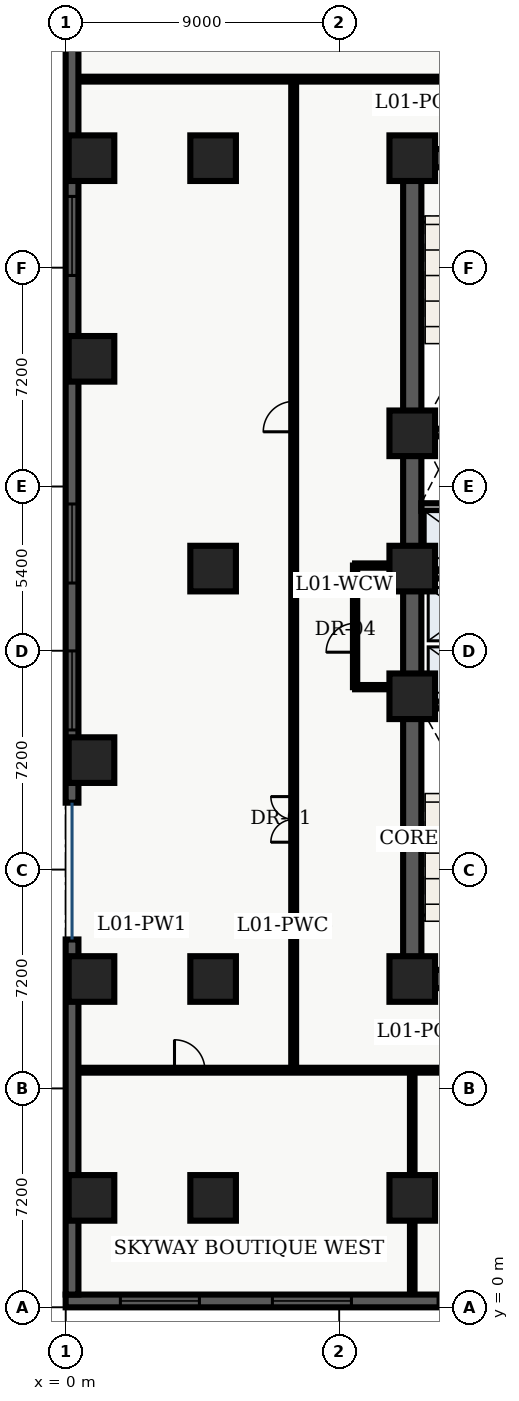
"""IFC4 building model, lengths in metres.
Left out: names, types, materials, properties, quantities, classifications, styles, units other than length and angle.
Written with IfcOpenShell. Run it as: python <this file> out.ifc"""

import sys

from ifc_helpers import new_model, entity, si_unit, converted_unit, direction, frame, origin_with_axes, origin_2d_with_axis, place, context, subcontext, project, spatial, polyline, rectangle, outline, extrude, element, fill, save


model = new_model("IFC4")
c1 = context("Model", 3, precision=1e-05, world=origin_with_axes(), true_north=direction((0.0, 1.0)))
c2 = subcontext(c1, "Body", "Model", "MODEL_VIEW")
j1 = project(units=[si_unit("LENGTHUNIT", "METRE"), converted_unit("PLANEANGLEUNIT", "DEGREE", entity("IfcPlaneAngleMeasure", 0.017), si_unit("PLANEANGLEUNIT", "RADIAN"), dimensions=[0, 0, 0, 0, 0, 0, 0])], contexts=[c1])
p1 = place(None, origin_with_axes())
s1 = spatial("IfcSite", under=j1, at=p1, CompositionType="ELEMENT")
p2 = place(p1, origin_with_axes())
s2 = spatial("IfcBuilding", under=s1, at=p2, CompositionType="ELEMENT")
p3 = place(p2, frame((0.0, 0.0, 5.7), z_axis=(0.0, 0.0, 1.0), x_axis=(1.0, 0.0, 0.0)))
s3 = spatial("IfcBuildingStorey", under=s2, at=p3, CompositionType="ELEMENT", Elevation=5.7)
p4 = place(p3, frame((11.4, 10.8, 0.0), z_axis=(0.0, 0.0, 1.0), x_axis=(0.0, 1.0, 0.0)))
e1 = element("IfcWall", 1, at=p4, inside=s3, PredefinedType="SHEAR", context=c2, shape_type="SweptSolid", body=[
    extrude(outline(polyline([(0.0, -0.3), (27.0, -0.3), (27.0, 0.3), (0.0, 0.3), (0.0, -0.3)])), origin_with_axes(), (0.0, 0.0, 1.0), 4.86),
])
p5 = place(p3, frame((11.4, 10.8, 0.0), z_axis=(0.0, 0.0, 1.0), x_axis=(1.0, 0.0, 0.0)))
e2 = element("IfcWall", 2, at=p5, inside=s3, PredefinedType="SHEAR", context=c2, shape_type="SweptSolid", body=[
    extrude(outline(polyline([(0.0, -0.3), (7.2, -0.3), (7.2, 0.3), (0.0, 0.3), (0.0, -0.3)])), origin_with_axes(), (0.0, 0.0, 1.0), 4.86),
])
p6 = place(p5, frame((2.625, 0.0, 0.0), z_axis=(0.0, 0.0, 1.0), x_axis=(1.0, 0.0, 0.0)))
e3 = element("IfcOpeningElement", 3, at=p6, cuts=e2, PredefinedType="OPENING", context=c2, shape_type="SweptSolid", body=[
    extrude(rectangle(XDim=1.05, YDim=0.62, at=origin_2d_with_axis()), origin_with_axes(), (0.0, 0.0, 1.0), 2.15),
])
p7 = place(p3, frame((11.4, 37.8, 0.0), z_axis=(0.0, 0.0, 1.0), x_axis=(1.0, 0.0, 0.0)))
e4 = element("IfcWall", 4, at=p7, inside=s3, PredefinedType="SHEAR", context=c2, shape_type="SweptSolid", body=[
    extrude(outline(polyline([(0.0, -0.3), (7.2, -0.3), (7.2, 0.3), (0.0, 0.3), (0.0, -0.3)])), origin_with_axes(), (0.0, 0.0, 1.0), 4.86),
])
p8 = place(p7, frame((2.625, 0.0, 0.0), z_axis=(0.0, 0.0, 1.0), x_axis=(1.0, 0.0, 0.0)))
e5 = element("IfcOpeningElement", 5, at=p8, cuts=e4, PredefinedType="OPENING", context=c2, shape_type="SweptSolid", body=[
    extrude(rectangle(XDim=1.05, YDim=0.62, at=origin_2d_with_axis()), origin_with_axes(), (0.0, 0.0, 1.0), 2.15),
])
for number, where, z_axis, x_axis in (
    (6, (11.7, 19.825, 0.0), (0.0, 0.0, 1.0), (1.0, 0.0, 0.0)),
    (7, (11.7, 28.775, 0.0), (0.0, 0.0, 1.0), (1.0, 0.0, 0.0)),
):
    element("IfcWall", number, at=place(p3, frame(where, z_axis=z_axis, x_axis=x_axis)), inside=s3, PredefinedType="SHEAR", context=c2, shape_type="SweptSolid", body=[
        extrude(outline(polyline([(0.0, -0.125), (6.6, -0.125), (6.6, 0.125), (0.0, 0.125), (0.0, -0.125)])), origin_with_axes(), (0.0, 0.0, 1.0), 4.86),
    ])
p9 = place(p3, frame((11.7, 24.1, 0.0), z_axis=(0.0, 0.0, 1.0), x_axis=(1.0, 0.0, 0.0)))
e8 = element("IfcWall", 8, at=p9, inside=s3, PredefinedType="SOLIDWALL", context=c2, shape_type="SweptSolid", body=[
    extrude(outline(polyline([(0.0, -0.125), (6.6, -0.125), (6.6, 0.125), (0.0, 0.125), (0.0, -0.125)])), origin_with_axes(), (0.0, 0.0, 1.0), 3.6),
])
p10 = place(p9, frame((3.75, 0.0, 0.0), z_axis=(0.0, 0.0, 1.0), x_axis=(1.0, 0.0, 0.0)))
e9 = element("IfcOpeningElement", 9, at=p10, cuts=e8, PredefinedType="OPENING", context=c2, shape_type="SweptSolid", body=[
    extrude(rectangle(XDim=0.9, YDim=0.27, at=origin_2d_with_axis()), origin_with_axes(), (0.0, 0.0, 1.0), 2.15),
])
p11 = place(p3, frame((11.7, 26.325, 0.0), z_axis=(0.0, 0.0, 1.0), x_axis=(1.0, 0.0, 0.0)))
e10 = element("IfcWall", 10, at=p11, inside=s3, PredefinedType="SOLIDWALL", context=c2, shape_type="SweptSolid", body=[
    extrude(outline(polyline([(0.0, -0.125), (6.6, -0.125), (6.6, 0.125), (0.0, 0.125), (0.0, -0.125)])), origin_with_axes(), (0.0, 0.0, 1.0), 3.6),
])
p12 = place(p11, frame((3.5, 0.0, 0.0), z_axis=(0.0, 0.0, 1.0), x_axis=(1.0, 0.0, 0.0)))
e11 = element("IfcOpeningElement", 11, at=p12, cuts=e10, PredefinedType="OPENING", context=c2, shape_type="SweptSolid", body=[
    extrude(rectangle(XDim=0.9, YDim=0.27, at=origin_2d_with_axis()), origin_with_axes(), (0.0, 0.0, 1.0), 2.15),
])
for number, where, z_axis, x_axis in (
    (12, (11.4, 3.6, 0.0), (0.0, 0.0, 1.0), (1.0, 0.0, 0.0)),
    (13, (11.4, 10.8, 0.0), (0.0, 0.0, 1.0), (1.0, 0.0, 0.0)),
    (14, (11.4, 20.1, 0.0), (0.0, 0.0, 1.0), (1.0, 0.0, 0.0)),
    (15, (11.4, 24.3, 0.0), (0.0, 0.0, 1.0), (1.0, 0.0, 0.0)),
    (16, (11.4, 28.75, 0.0), (0.0, 0.0, 1.0), (1.0, 0.0, 0.0)),
    (17, (11.4, 37.8, 0.0), (0.0, 0.0, 1.0), (1.0, 0.0, 0.0)),
    (18, (4.85, 3.6, 0.0), (0.0, 0.0, 1.0), (1.0, 0.0, 0.0)),
    (19, (4.85, 10.8, 0.0), (0.0, 0.0, 1.0), (1.0, 0.0, 0.0)),
    (20, (4.85, 24.3, 0.0), (0.0, 0.0, 1.0), (1.0, 0.0, 0.0)),
    (21, (4.85, 37.8, 0.0), (0.0, 0.0, 1.0), (1.0, 0.0, 0.0)),
    (22, (0.85, 3.6, 0.0), (0.0, 0.0, 1.0), (1.0, 0.0, 0.0)),
    (23, (0.85, 10.8, 0.0), (0.0, 0.0, 1.0), (1.0, 0.0, 0.0)),
    (24, (0.85, 18.0, 0.0), (0.0, 0.0, 1.0), (1.0, 0.0, 0.0)),
    (25, (0.85, 31.2, 0.0), (0.0, 0.0, 1.0), (1.0, 0.0, 0.0)),
    (26, (0.85, 37.8, 0.0), (0.0, 0.0, 1.0), (1.0, 0.0, 0.0)),
):
    element("IfcColumn", number, at=place(p3, frame(where, z_axis=z_axis, x_axis=x_axis)), inside=s3, PredefinedType="COLUMN", context=c2, shape_type="SweptSolid", body=[
        extrude(rectangle(XDim=1.5, YDim=1.5, at=origin_2d_with_axis()), origin_with_axes(), (0.0, 0.0, 1.0), 5.1),
    ])
p13 = place(p3, frame((9.52, 20.4, 0.0), z_axis=(0.0, 0.0, 1.0), x_axis=(0.0, 1.0, 0.0)))
e27 = element("IfcWall", 27, at=p13, inside=s3, PredefinedType="PARTITIONING", context=c2, shape_type="SweptSolid", body=[
    extrude(outline(polyline([(0.0, -0.07), (4.0, -0.07), (4.0, 0.07), (0.0, 0.07), (0.0, -0.07)])), origin_with_axes(), (0.0, 0.0, 1.0), 3.2),
])
p14 = place(p13, frame((1.625, 0.0, 0.0), z_axis=(0.0, 0.0, 1.0), x_axis=(1.0, 0.0, 0.0)))
e28 = element("IfcOpeningElement", 28, at=p14, cuts=e27, PredefinedType="OPENING", context=c2, shape_type="SweptSolid", body=[
    extrude(rectangle(XDim=0.95, YDim=0.16, at=origin_2d_with_axis()), origin_with_axes(), (0.0, 0.0, 1.0), 2.15),
])
for number, where, z_axis, x_axis in (
    (29, (9.52, 20.4, 0.0), (0.0, 0.0, 1.0), (1.0, 0.0, 0.0)),
    (30, (9.52, 24.4, 0.0), (0.0, 0.0, 1.0), (1.0, 0.0, 0.0)),
):
    element("IfcWall", number, at=place(p3, frame(where, z_axis=z_axis, x_axis=x_axis)), inside=s3, PredefinedType="PARTITIONING", context=c2, shape_type="SweptSolid", body=[
        extrude(outline(polyline([(0.0, -0.07), (1.58, -0.07), (1.58, 0.07), (0.0, 0.07), (0.0, -0.07)])), origin_with_axes(), (0.0, 0.0, 1.0), 3.2),
    ])
p15 = place(p3, frame((0.38, 7.8, 0.0), z_axis=(0.0, 0.0, 1.0), x_axis=(1.0, 0.0, 0.0)))
e31 = element("IfcWall", 31, at=p15, inside=s3, PredefinedType="PARTITIONING", context=c2, shape_type="SweptSolid", body=[
    extrude(outline(polyline([(0.0, -0.08), (20.92, -0.08), (20.92, 0.08), (0.0, 0.08), (0.0, -0.08)])), origin_with_axes(), (0.0, 0.0, 1.0), 3.2),
])
p16 = place(p15, frame((3.7, 0.0, 0.0), z_axis=(0.0, 0.0, 1.0), x_axis=(1.0, 0.0, 0.0)))
e32 = element("IfcOpeningElement", 32, at=p16, cuts=e31, PredefinedType="OPENING", context=c2, shape_type="SweptSolid", body=[
    extrude(rectangle(XDim=1.0, YDim=0.18, at=origin_2d_with_axis()), origin_with_axes(), (0.0, 0.0, 1.0), 2.15),
])
p17 = place(p15, frame((15.3, 0.0, 0.0), z_axis=(0.0, 0.0, 1.0), x_axis=(1.0, 0.0, 0.0)))
e33 = element("IfcOpeningElement", 33, at=p17, cuts=e31, PredefinedType="OPENING", context=c2, shape_type="SweptSolid", body=[
    extrude(rectangle(XDim=1.0, YDim=0.18, at=origin_2d_with_axis()), origin_with_axes(), (0.0, 0.0, 1.0), 2.15),
])
p18 = place(p3, frame((11.4, 0.38, 0.0), z_axis=(0.0, 0.0, 1.0), x_axis=(0.0, 1.0, 0.0)))
e34 = element("IfcWall", 34, at=p18, inside=s3, PredefinedType="PARTITIONING", context=c2, shape_type="SweptSolid", body=[
    extrude(outline(polyline([(0.0, -0.075), (7.42, -0.075), (7.42, 0.075), (0.0, 0.075), (0.0, -0.075)])), origin_with_axes(), (0.0, 0.0, 1.0), 3.2),
])
p19 = place(p3, frame((0.38, 40.4, 0.0), z_axis=(0.0, 0.0, 1.0), x_axis=(1.0, 0.0, 0.0)))
e35 = element("IfcWall", 35, at=p19, inside=s3, PredefinedType="PARTITIONING", context=c2, shape_type="SweptSolid", body=[
    extrude(outline(polyline([(0.0, -0.08), (20.92, -0.08), (20.92, 0.08), (0.0, 0.08), (0.0, -0.08)])), origin_with_axes(), (0.0, 0.0, 1.0), 3.2),
])
p20 = place(p19, frame((15.25, 0.0, 0.0), z_axis=(0.0, 0.0, 1.0), x_axis=(1.0, 0.0, 0.0)))
e36 = element("IfcOpeningElement", 36, at=p20, cuts=e35, PredefinedType="OPENING", context=c2, shape_type="SweptSolid", body=[
    extrude(rectangle(XDim=1.5, YDim=0.18, at=origin_2d_with_axis()), origin_with_axes(), (0.0, 0.0, 1.0), 2.2),
])
p21 = place(p3, frame((7.5, 7.8, 0.0), z_axis=(0.0, 0.0, 1.0), x_axis=(0.0, 1.0, 0.0)))
e37 = element("IfcWall", 37, at=p21, inside=s3, PredefinedType="PARTITIONING", context=c2, shape_type="SweptSolid", body=[
    extrude(outline(polyline([(0.0, -0.08), (32.6, -0.08), (32.6, 0.08), (0.0, 0.08), (0.0, -0.08)])), origin_with_axes(), (0.0, 0.0, 1.0), 3.2),
])
p22 = place(p21, frame((8.25, 0.0, 0.0), z_axis=(0.0, 0.0, 1.0), x_axis=(1.0, 0.0, 0.0)))
e38 = element("IfcOpeningElement", 38, at=p22, cuts=e37, PredefinedType="OPENING", context=c2, shape_type="SweptSolid", body=[
    extrude(rectangle(XDim=1.5, YDim=0.18, at=origin_2d_with_axis()), origin_with_axes(), (0.0, 0.0, 1.0), 2.2),
])
p23 = place(p21, frame((21.5, 0.0, 0.0), z_axis=(0.0, 0.0, 1.0), x_axis=(1.0, 0.0, 0.0)))
e39 = element("IfcOpeningElement", 39, at=p23, cuts=e37, PredefinedType="OPENING", context=c2, shape_type="SweptSolid", body=[
    extrude(rectangle(XDim=1.0, YDim=0.18, at=origin_2d_with_axis()), origin_with_axes(), (0.0, 0.0, 1.0), 2.15),
])
p24 = place(p3, frame((31.2, 0.21, 0.0), z_axis=(0.0, 0.0, 1.0), x_axis=(-1.0, 0.0, 0.0)))
e40 = element("IfcWall", 40, at=p24, inside=s3, PredefinedType="SOLIDWALL", context=c2, shape_type="SweptSolid", body=[
    extrude(outline(polyline([(0.0, -0.21), (31.2, -0.21), (31.2, 0.21), (0.0, 0.21), (0.0, -0.21)])), origin_with_axes(), (0.0, 0.0, 1.0), 4.86),
])
p25 = place(p24, frame((3.1, 0.0, 0.45), z_axis=(0.0, 0.0, 1.0), x_axis=(1.0, 0.0, 0.0)))
e41 = element("IfcOpeningElement", 41, at=p25, cuts=e40, PredefinedType="OPENING", context=c2, shape_type="SweptSolid", body=[
    extrude(rectangle(XDim=2.6, YDim=0.44, at=origin_2d_with_axis()), origin_with_axes(), (0.0, 0.0, 1.0), 2.8),
])
p26 = place(p24, frame((7.65, 0.0, 0.45), z_axis=(0.0, 0.0, 1.0), x_axis=(1.0, 0.0, 0.0)))
e42 = element("IfcOpeningElement", 42, at=p26, cuts=e40, PredefinedType="OPENING", context=c2, shape_type="SweptSolid", body=[
    extrude(rectangle(XDim=2.6, YDim=0.44, at=origin_2d_with_axis()), origin_with_axes(), (0.0, 0.0, 1.0), 2.8),
])
p27 = place(p24, frame((13.1, 0.0, 0.45), z_axis=(0.0, 0.0, 1.0), x_axis=(1.0, 0.0, 0.0)))
e43 = element("IfcOpeningElement", 43, at=p27, cuts=e40, PredefinedType="OPENING", context=c2, shape_type="SweptSolid", body=[
    extrude(rectangle(XDim=2.6, YDim=0.44, at=origin_2d_with_axis()), origin_with_axes(), (0.0, 0.0, 1.0), 2.8),
])
p28 = place(p24, frame((17.65, 0.0, 0.45), z_axis=(0.0, 0.0, 1.0), x_axis=(1.0, 0.0, 0.0)))
e44 = element("IfcOpeningElement", 44, at=p28, cuts=e40, PredefinedType="OPENING", context=c2, shape_type="SweptSolid", body=[
    extrude(rectangle(XDim=2.6, YDim=0.44, at=origin_2d_with_axis()), origin_with_axes(), (0.0, 0.0, 1.0), 2.8),
])
p29 = place(p24, frame((23.1, 0.0, 0.45), z_axis=(0.0, 0.0, 1.0), x_axis=(1.0, 0.0, 0.0)))
e45 = element("IfcOpeningElement", 45, at=p29, cuts=e40, PredefinedType="OPENING", context=c2, shape_type="SweptSolid", body=[
    extrude(rectangle(XDim=2.6, YDim=0.44, at=origin_2d_with_axis()), origin_with_axes(), (0.0, 0.0, 1.0), 2.8),
])
p30 = place(p24, frame((28.1, 0.0, 0.45), z_axis=(0.0, 0.0, 1.0), x_axis=(1.0, 0.0, 0.0)))
e46 = element("IfcOpeningElement", 46, at=p30, cuts=e40, PredefinedType="OPENING", context=c2, shape_type="SweptSolid", body=[
    extrude(rectangle(XDim=2.6, YDim=0.44, at=origin_2d_with_axis()), origin_with_axes(), (0.0, 0.0, 1.0), 2.8),
])
p31 = place(p3, frame((0.21, 0.42, 0.0), z_axis=(0.0, 0.0, 1.0), x_axis=(0.0, 1.0, 0.0)))
e47 = element("IfcWall", 47, at=p31, inside=s3, PredefinedType="SOLIDWALL", context=c2, shape_type="SweptSolid", body=[
    extrude(outline(polyline([(0.0, -0.21), (11.68, -0.21), (11.68, 0.21), (0.0, 0.21), (0.0, -0.21)])), origin_with_axes(), (0.0, 0.0, 1.0), 4.86),
])
p32 = place(p3, frame((0.21, 16.6, 0.0), z_axis=(0.0, 0.0, 1.0), x_axis=(0.0, 1.0, 0.0)))
e48 = element("IfcWall", 48, at=p32, inside=s3, PredefinedType="SOLIDWALL", context=c2, shape_type="SweptSolid", body=[
    extrude(outline(polyline([(0.0, -0.21), (32.9, -0.21), (32.9, 0.21), (0.0, 0.21), (0.0, -0.21)])), origin_with_axes(), (0.0, 0.0, 1.0), 4.86),
])
p33 = place(p32, frame((3.692, 0.0, 0.45), z_axis=(0.0, 0.0, 1.0), x_axis=(1.0, 0.0, 0.0)))
e49 = element("IfcOpeningElement", 49, at=p33, cuts=e48, PredefinedType="OPENING", context=c2, shape_type="SweptSolid", body=[
    extrude(rectangle(XDim=2.6, YDim=0.44, at=origin_2d_with_axis()), origin_with_axes(), (0.0, 0.0, 1.0), 2.8),
])
p34 = place(p32, frame((8.525, 0.0, 0.45), z_axis=(0.0, 0.0, 1.0), x_axis=(1.0, 0.0, 0.0)))
e50 = element("IfcOpeningElement", 50, at=p34, cuts=e48, PredefinedType="OPENING", context=c2, shape_type="SweptSolid", body=[
    extrude(rectangle(XDim=2.6, YDim=0.44, at=origin_2d_with_axis()), origin_with_axes(), (0.0, 0.0, 1.0), 2.8),
])
p35 = place(p32, frame((18.642, 0.0, 0.45), z_axis=(0.0, 0.0, 1.0), x_axis=(1.0, 0.0, 0.0)))
e51 = element("IfcOpeningElement", 51, at=p35, cuts=e48, PredefinedType="OPENING", context=c2, shape_type="SweptSolid", body=[
    extrude(rectangle(XDim=2.6, YDim=0.44, at=origin_2d_with_axis()), origin_with_axes(), (0.0, 0.0, 1.0), 2.8),
])
p36 = place(p13, frame((1.625, 0.0, 0.0), z_axis=(0.0, 0.0, 1.0), x_axis=(1.0, 0.0, 0.0)))
e52 = element("IfcDoor", 52, at=p36, inside=s3, OperationType="SINGLE_SWING_LEFT", PredefinedType="DOOR", context=c2, shape_type="SweptSolid", body=[
    extrude(rectangle(XDim=0.95, YDim=0.084, at=origin_2d_with_axis()), origin_with_axes(), (0.0, 0.0, 1.0), 2.15),
])
fill(e28, e52)
p37 = place(p15, frame((3.7, 0.0, 0.0), z_axis=(0.0, 0.0, 1.0), x_axis=(1.0, 0.0, 0.0)))
e53 = element("IfcDoor", 53, at=p37, inside=s3, OperationType="SINGLE_SWING_LEFT", PredefinedType="DOOR", context=c2, shape_type="SweptSolid", body=[
    extrude(rectangle(XDim=1.0, YDim=0.09, at=origin_2d_with_axis()), origin_with_axes(), (0.0, 0.0, 1.0), 2.15),
])
fill(e32, e53)
p38 = place(p21, frame((8.25, 0.0, 0.0), z_axis=(0.0, 0.0, 1.0), x_axis=(1.0, 0.0, 0.0)))
e54 = element("IfcDoor", 54, at=p38, inside=s3, OperationType="DOUBLE_DOOR_SINGLE_SWING", PredefinedType="DOOR", context=c2, shape_type="SweptSolid", body=[
    extrude(rectangle(XDim=1.5, YDim=0.09, at=origin_2d_with_axis()), origin_with_axes(), (0.0, 0.0, 1.0), 2.2),
])
fill(e38, e54)
p39 = place(p21, frame((21.5, 0.0, 0.0), z_axis=(0.0, 0.0, 1.0), x_axis=(1.0, 0.0, 0.0)))
e55 = element("IfcDoor", 55, at=p39, inside=s3, OperationType="SINGLE_SWING_LEFT", PredefinedType="DOOR", context=c2, shape_type="SweptSolid", body=[
    extrude(rectangle(XDim=1.0, YDim=0.09, at=origin_2d_with_axis()), origin_with_axes(), (0.0, 0.0, 1.0), 2.15),
])
fill(e39, e55)
p40 = place(p24, frame((17.65, 0.0, 0.45), z_axis=(0.0, 0.0, 1.0), x_axis=(1.0, 0.0, 0.0)))
e56 = element("IfcWindow", 56, at=p40, inside=s3, PredefinedType="WINDOW", context=c2, shape_type="SweptSolid", body=[
    extrude(rectangle(XDim=2.6, YDim=0.09, at=origin_2d_with_axis()), origin_with_axes(), (0.0, 0.0, 1.0), 2.8),
])
fill(e44, e56)
p41 = place(p24, frame((23.1, 0.0, 0.45), z_axis=(0.0, 0.0, 1.0), x_axis=(1.0, 0.0, 0.0)))
e57 = element("IfcWindow", 57, at=p41, inside=s3, PredefinedType="WINDOW", context=c2, shape_type="SweptSolid", body=[
    extrude(rectangle(XDim=2.6, YDim=0.09, at=origin_2d_with_axis()), origin_with_axes(), (0.0, 0.0, 1.0), 2.8),
])
fill(e45, e57)
p42 = place(p24, frame((28.1, 0.0, 0.45), z_axis=(0.0, 0.0, 1.0), x_axis=(1.0, 0.0, 0.0)))
e58 = element("IfcWindow", 58, at=p42, inside=s3, PredefinedType="WINDOW", context=c2, shape_type="SweptSolid", body=[
    extrude(rectangle(XDim=2.6, YDim=0.09, at=origin_2d_with_axis()), origin_with_axes(), (0.0, 0.0, 1.0), 2.8),
])
fill(e46, e58)
p43 = place(p32, frame((3.692, 0.0, 0.45), z_axis=(0.0, 0.0, 1.0), x_axis=(1.0, 0.0, 0.0)))
e59 = element("IfcWindow", 59, at=p43, inside=s3, PredefinedType="WINDOW", context=c2, shape_type="SweptSolid", body=[
    extrude(rectangle(XDim=2.6, YDim=0.09, at=origin_2d_with_axis()), origin_with_axes(), (0.0, 0.0, 1.0), 2.8),
])
fill(e49, e59)
p44 = place(p32, frame((8.525, 0.0, 0.45), z_axis=(0.0, 0.0, 1.0), x_axis=(1.0, 0.0, 0.0)))
e60 = element("IfcWindow", 60, at=p44, inside=s3, PredefinedType="WINDOW", context=c2, shape_type="SweptSolid", body=[
    extrude(rectangle(XDim=2.6, YDim=0.09, at=origin_2d_with_axis()), origin_with_axes(), (0.0, 0.0, 1.0), 2.8),
])
fill(e50, e60)
p45 = place(p32, frame((18.642, 0.0, 0.45), z_axis=(0.0, 0.0, 1.0), x_axis=(1.0, 0.0, 0.0)))
e61 = element("IfcWindow", 61, at=p45, inside=s3, PredefinedType="WINDOW", context=c2, shape_type="SweptSolid", body=[
    extrude(rectangle(XDim=2.6, YDim=0.09, at=origin_2d_with_axis()), origin_with_axes(), (0.0, 0.0, 1.0), 2.8),
])
fill(e51, e61)
save(model, sys.argv[1])
